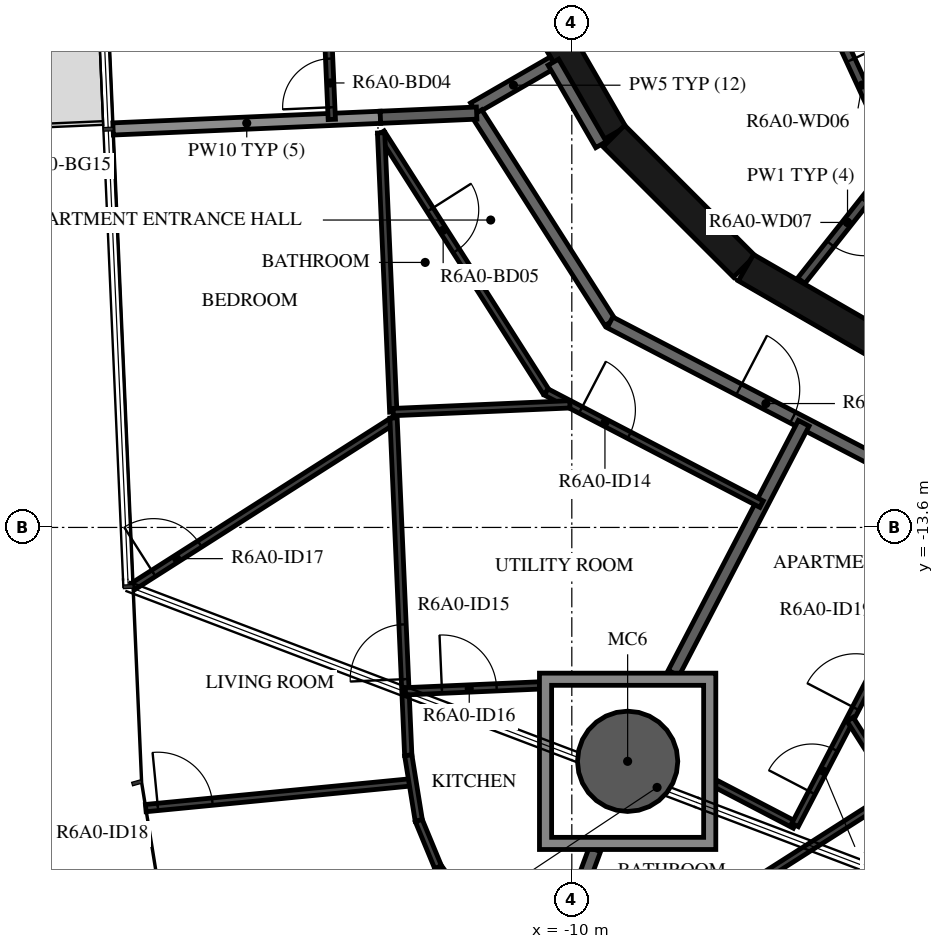
"""IFC4 building model, lengths in metres.
Left out: names, types, materials, properties, quantities, classifications, styles, units other than length and angle.
Written with IfcOpenShell. Run it as: python <this file> out.ifc"""

import sys

from ifc_helpers import new_model, si_unit, direction, frame, frame_2d, origin, origin_2d, place, context, subcontext, project, spatial, polyline, rectangle, hollow_circle, outline, extrude, element, fill, save


model = new_model("IFC4")
c1 = context("Model", 3, precision=1e-05, world=origin(), true_north=direction((0.0, 1.0)))
c2 = subcontext(c1, "Body", "Model", "MODEL_VIEW")
j1 = project(units=[si_unit("LENGTHUNIT", "METRE"), si_unit("PLANEANGLEUNIT", "RADIAN")], contexts=[c1])
p1 = place(None, origin())
s1 = spatial("IfcSite", under=j1, at=p1, CompositionType="ELEMENT")
p2 = place(p1, origin())
s2 = spatial("IfcBuilding", under=s1, at=p2, CompositionType="ELEMENT")
p3 = place(p2, frame((0.0, 0.0, 233.7)))
s3 = spatial("IfcBuildingStorey", under=s2, at=p3, CompositionType="ELEMENT", Elevation=233.7)
p4 = place(p3, frame((-9.082, -17.446, -0.38), z_axis=(0.0, 0.0, 1.0), x_axis=(1.0, 0.0, 0.0)))
e1 = element("IfcColumn", 1, at=p4, inside=s3, PredefinedType="COLUMN", context=c2, shape_type="SweptSolid", body=[
    extrude(hollow_circle(Radius=0.825, WallThickness=0.04, at=origin_2d()), origin(), (0.0, 0.0, 1.0), 3.5),
])
p5 = place(p3, frame((-10.845, -4.51, 0.0), z_axis=(0.0, 0.0, 1.0), x_axis=(0.500087131594, -0.865975092491, 0.0)))
e2 = element("IfcWall", 2, at=p5, inside=s3, PredefinedType="SHEAR", context=c2, shape_type="SweptSolid", body=[
    extrude(rectangle(XDim=3.033, YDim=0.5, at=frame_2d((1.516, 0.0))), origin(), (0.0, 0.0, 1.0), 3.12),
])
p6 = place(p3, frame((-9.308, -7.164, 0.0), z_axis=(0.0, 0.0, 1.0), x_axis=(0.707106781187, -0.707106781187, 0.0)))
e3 = element("IfcWall", 3, at=p6, inside=s3, PredefinedType="SHEAR", context=c2, shape_type="SweptSolid", body=[
    extrude(rectangle(XDim=3.032, YDim=0.5, at=frame_2d((1.516, 0.0))), origin(), (0.0, 0.0, 1.0), 3.12),
])
p7 = place(p3, frame((-7.137, -9.329, 0.0), z_axis=(0.0, 0.0, 1.0), x_axis=(0.865975092491, -0.500087131594, 0.0)))
e4 = element("IfcWall", 4, at=p7, inside=s3, PredefinedType="SHEAR", context=c2, shape_type="SweptSolid", body=[
    extrude(rectangle(XDim=3.033, YDim=0.5, at=frame_2d((1.516, 0.0))), origin(), (0.0, 0.0, 1.0), 3.12),
])
p8 = place(p3, frame((-5.795, -5.086, 0.0), z_axis=(0.0, 0.0, 1.0), x_axis=(0.417887867606, -0.908498613157, 0.0)))
e5 = element("IfcWall", 5, at=p8, inside=s3, PredefinedType="PARTITIONING", context=c2, shape_type="SweptSolid", body=[
    extrude(rectangle(XDim=2.726, YDim=0.15, at=frame_2d((1.363, 0.0))), origin(), (0.0, 0.0, 1.0), 3.12),
])
p9 = place(p8, frame((0.913, 0.0, 0.0)))
e6 = element("IfcOpeningElement", 6, at=p9, cuts=e5, PredefinedType="OPENING", context=c2, shape_type="SweptSolid", body=[
    extrude(rectangle(XDim=0.9, YDim=2.1, at=frame_2d((0.45, 1.05))), frame((0.0, 0.085, 0.0), z_axis=(0.0, -1.0, 0.0), x_axis=(1.0, 0.0, 0.0)), (0.0, 0.0, 1.0), 0.17),
])
p10 = place(p3, frame((-4.706, -7.625, 0.0), z_axis=(0.0, 0.0, 1.0), x_axis=(-0.621392599334, -0.783499353856, 0.0)))
e7 = element("IfcWall", 7, at=p10, inside=s3, PredefinedType="PARTITIONING", context=c2, shape_type="SweptSolid", body=[
    extrude(rectangle(XDim=2.447, YDim=0.15, at=frame_2d((1.224, 0.0))), origin(), (0.0, 0.0, 1.0), 3.12),
])
p11 = place(p10, frame((0.774, 0.0, 0.0)))
e8 = element("IfcOpeningElement", 8, at=p11, cuts=e7, PredefinedType="OPENING", context=c2, shape_type="SweptSolid", body=[
    extrude(rectangle(XDim=0.9, YDim=2.1, at=frame_2d((0.45, 1.05))), frame((0.0, 0.085, 0.0), z_axis=(0.0, -1.0, 0.0), x_axis=(1.0, 0.0, 0.0)), (0.0, 0.0, 1.0), 0.17),
])
p12 = place(p3, frame((-10.303, -5.949, 0.0), z_axis=(0.0, 0.0, 1.0), x_axis=(-0.866043382451, -0.499968858743, 0.0)))
e9 = element("IfcWall", 9, at=p12, inside=s3, PredefinedType="STANDARD", context=c2, shape_type="SweptSolid", body=[
    extrude(rectangle(XDim=1.515, YDim=0.2, at=frame_2d((0.758, 0.0))), origin(), (0.0, 0.0, 1.0), 3.12),
])
p13 = place(p3, frame((-9.52, -7.305, 0.0), z_axis=(0.0, 0.0, 1.0), x_axis=(-0.500028278809, 0.866009076391, 0.0)))
e10 = element("IfcWall", 10, at=p13, inside=s3, PredefinedType="STANDARD", context=c2, shape_type="SweptSolid", body=[
    extrude(rectangle(XDim=1.566, YDim=0.2, at=frame_2d((0.783, 0.0))), origin(), (0.0, 0.0, 1.0), 3.12),
])
p14 = place(p3, frame((-11.565, -6.786, 0.0), z_axis=(0.0, 0.0, 1.0), x_axis=(0.537297327359, -0.843392898958, 0.0)))
e11 = element("IfcWall", 11, at=p14, inside=s3, PredefinedType="STANDARD", context=c2, shape_type="SweptSolid", body=[
    extrude(rectangle(XDim=4.081, YDim=0.2, at=frame_2d((2.041, 0.0))), origin(), (0.0, 0.0, 1.0), 3.12),
])
p15 = place(p3, frame((-9.372, -10.228, 0.0), z_axis=(0.0, 0.0, 1.0), x_axis=(0.887005184532, -0.461759464021, 0.0)))
e12 = element("IfcWall", 12, at=p15, inside=s3, PredefinedType="STANDARD", context=c2, shape_type="SweptSolid", body=[
    extrude(rectangle(XDim=7.181, YDim=0.2, at=frame_2d((3.591, 0.0))), origin(), (0.0, 0.0, 1.0), 3.12),
])
p16 = place(p15, frame((2.391, 0.0, 0.0)))
e13 = element("IfcOpeningElement", 13, at=p16, cuts=e12, PredefinedType="OPENING", context=c2, shape_type="SweptSolid", body=[
    extrude(rectangle(XDim=1.0, YDim=2.1, at=frame_2d((0.5, 1.05))), frame((0.0, 0.11, 0.0), z_axis=(0.0, -1.0, 0.0), x_axis=(1.0, 0.0, 0.0)), (0.0, 0.0, 1.0), 0.22),
])
p17 = place(p3, frame((-17.544, -7.047, 0.0), z_axis=(0.0, 0.0, 1.0), x_axis=(0.99904608111, 0.043668384662, 0.0)))
e14 = element("IfcWall", 14, at=p17, inside=s3, PredefinedType="STANDARD", context=c2, shape_type="SweptSolid", body=[
    extrude(rectangle(XDim=4.4, YDim=0.2, at=frame_2d((2.2, 0.0))), origin(), (0.0, 0.0, 1.0), 2.73),
])
p18 = place(p3, frame((-13.148, -6.855, 0.0), z_axis=(0.0, 0.0, 1.0), x_axis=(0.999048583464, 0.043611098121, 0.0)))
e15 = element("IfcWall", 15, at=p18, inside=s3, PredefinedType="STANDARD", context=c2, shape_type="SweptSolid", body=[
    extrude(rectangle(XDim=1.584, YDim=0.2, at=frame_2d((0.792, 0.0))), origin(), (0.0, 0.0, 1.0), 3.12),
])
p19 = place(p3, frame((-8.326, -15.996, 0.0), z_axis=(0.0, 0.0, 1.0), x_axis=(0.461739255077, 0.887015704664, 0.0)))
e16 = element("IfcWall", 16, at=p19, inside=s3, PredefinedType="STANDARD", context=c2, shape_type="SweptSolid", body=[
    extrude(rectangle(XDim=4.633, YDim=0.2, at=frame_2d((2.317, 0.0))), origin(), (0.0, 0.0, 1.0), 3.12),
])
p20 = place(p3, frame((-10.044, -20.036, 0.0), z_axis=(0.0, 0.0, 1.0), x_axis=(0.348282344491, 0.937389678051, 0.0)))
e17 = element("IfcWall", 17, at=p20, inside=s3, PredefinedType="STANDARD", context=c2, shape_type="SweptSolid", body=[
    extrude(rectangle(XDim=1.216, YDim=0.2, at=frame_2d((0.608, 0.0))), origin(), (0.0, 0.0, 1.0), 3.12),
])
p21 = place(p3, frame((-13.947, -6.89, 0.0), z_axis=(0.0, 0.0, 1.0), x_axis=(-0.043680814195, 0.999045537737, 0.0)))
e18 = element("IfcWall", 18, at=p21, inside=s3, PredefinedType="PARTITIONING", context=c2, shape_type="SweptSolid", body=[
    extrude(rectangle(XDim=2.392, YDim=0.12, at=frame_2d((1.196, 0.0))), origin(), (0.0, 0.0, 1.0), 3.12),
])
p22 = place(p21, frame((0.2, 0.0, 0.0)))
e19 = element("IfcOpeningElement", 19, at=p22, cuts=e18, PredefinedType="OPENING", context=c2, shape_type="SweptSolid", body=[
    extrude(rectangle(XDim=0.8, YDim=2.1, at=frame_2d((0.4, 1.05))), frame((0.0, 0.07, 0.0), z_axis=(0.0, -1.0, 0.0), x_axis=(1.0, 0.0, 0.0)), (0.0, 0.0, 1.0), 0.14),
])
p23 = place(p3, frame((-13.137, -7.111, 0.0), z_axis=(0.0, 0.0, 1.0), x_axis=(0.537300549444, -0.843390846267, 0.0)))
e20 = element("IfcWall", 20, at=p23, inside=s3, PredefinedType="PARTITIONING", context=c2, shape_type="SweptSolid", body=[
    extrude(rectangle(XDim=5.054, YDim=0.12, at=frame_2d((2.527, 0.0))), origin(), (0.0, 0.0, 1.0), 3.12),
])
p24 = place(p23, frame((1.5, 0.0, 0.0)))
e21 = element("IfcOpeningElement", 21, at=p24, cuts=e20, PredefinedType="OPENING", context=c2, shape_type="SweptSolid", body=[
    extrude(rectangle(XDim=0.8, YDim=2.1, at=frame_2d((0.4, 1.05))), frame((0.0, 0.07, 0.0), z_axis=(0.0, -1.0, 0.0), x_axis=(1.0, 0.0, 0.0)), (0.0, 0.0, 1.0), 0.14),
])
p25 = place(p3, frame((-10.421, -11.373, 0.0), z_axis=(0.0, 0.0, 1.0), x_axis=(0.887006451745, -0.461757029792, 0.0)))
e22 = element("IfcWall", 22, at=p25, inside=s3, PredefinedType="PARTITIONING", context=c2, shape_type="SweptSolid", body=[
    extrude(rectangle(XDim=3.992, YDim=0.12, at=frame_2d((1.996, 0.0))), origin(), (0.0, 0.0, 1.0), 3.12),
])
p26 = place(p25, frame((0.639, 0.0, 0.0)))
e23 = element("IfcOpeningElement", 23, at=p26, cuts=e22, PredefinedType="OPENING", context=c2, shape_type="SweptSolid", body=[
    extrude(rectangle(XDim=0.9, YDim=2.1, at=frame_2d((0.45, 1.05))), frame((0.0, 0.07, 0.0), z_axis=(0.0, -1.0, 0.0), x_axis=(1.0, 0.0, 0.0)), (0.0, 0.0, 1.0), 0.14),
])
p27 = place(p3, frame((-12.936, -11.703, 0.0), z_axis=(0.0, 0.0, 1.0), x_axis=(-0.043610108597, 0.999048626658, 0.0)))
e24 = element("IfcWall", 24, at=p27, inside=s3, PredefinedType="PARTITIONING", context=c2, shape_type="SweptSolid", body=[
    extrude(rectangle(XDim=4.596, YDim=0.12, at=frame_2d((2.298, 0.0))), origin(), (0.0, 0.0, 1.0), 3.12),
])
p28 = place(p3, frame((-17.215, -14.57, 0.0), z_axis=(0.0, 0.0, 1.0), x_axis=(0.843396239681, 0.537292083407, 0.0)))
e25 = element("IfcWall", 25, at=p28, inside=s3, PredefinedType="PARTITIONING", context=c2, shape_type="SweptSolid", body=[
    extrude(rectangle(XDim=5.081, YDim=0.12, at=frame_2d((2.54, 0.0))), origin(), (0.0, 0.0, 1.0), 3.12),
])
p29 = place(p28, frame((0.4, 0.0, 0.0)))
e26 = element("IfcOpeningElement", 26, at=p29, cuts=e25, PredefinedType="OPENING", context=c2, shape_type="SweptSolid", body=[
    extrude(rectangle(XDim=0.9, YDim=2.1, at=frame_2d((0.45, 1.05))), frame((0.0, 0.07, 0.0), z_axis=(0.0, -1.0, 0.0), x_axis=(1.0, 0.0, 0.0)), (0.0, 0.0, 1.0), 0.14),
])
p30 = place(p3, frame((-12.936, -11.703, 0.0), z_axis=(0.0, 0.0, 1.0), x_axis=(0.999046310188, 0.043663143495, 0.0)))
e27 = element("IfcWall", 27, at=p30, inside=s3, PredefinedType="PARTITIONING", context=c2, shape_type="SweptSolid", body=[
    extrude(rectangle(XDim=2.907, YDim=0.12, at=frame_2d((1.454, 0.0))), origin(), (0.0, 0.0, 1.0), 3.12),
])
p31 = place(p3, frame((-12.69, -17.347, 0.0), z_axis=(0.0, 0.0, 1.0), x_axis=(-0.043618497177, 0.999048260448, 0.0)))
e28 = element("IfcWall", 28, at=p31, inside=s3, PredefinedType="PARTITIONING", context=c2, shape_type="SweptSolid", body=[
    extrude(rectangle(XDim=5.552, YDim=0.12, at=frame_2d((2.776, 0.0))), origin(), (0.0, 0.0, 1.0), 3.12),
])
p32 = place(p31, frame((1.254, 0.0, 0.0)))
e29 = element("IfcOpeningElement", 29, at=p32, cuts=e28, PredefinedType="OPENING", context=c2, shape_type="SweptSolid", body=[
    extrude(rectangle(XDim=0.9, YDim=2.1, at=frame_2d((0.45, 1.05))), frame((0.0, 0.07, 0.0), z_axis=(0.0, -1.0, 0.0), x_axis=(1.0, 0.0, 0.0)), (0.0, 0.0, 1.0), 0.14),
])
p33 = place(p3, frame((-17.007, -18.216, 0.0), z_axis=(0.0, 0.0, 1.0), x_axis=(0.995320337688, 0.09663035436, 0.0)))
e30 = element("IfcWall", 30, at=p33, inside=s3, PredefinedType="PARTITIONING", context=c2, shape_type="SweptSolid", body=[
    extrude(rectangle(XDim=4.409, YDim=0.12, at=frame_2d((2.205, 0.0))), origin(), (0.0, 0.0, 1.0), 3.12),
])
p34 = place(p33, frame((0.2, 0.0, 0.0)))
e31 = element("IfcOpeningElement", 31, at=p34, cuts=e30, PredefinedType="OPENING", context=c2, shape_type="SweptSolid", body=[
    extrude(rectangle(XDim=0.9, YDim=2.1, at=frame_2d((0.45, 1.05))), frame((0.0, 0.07, 0.0), z_axis=(0.0, -1.0, 0.0), x_axis=(1.0, 0.0, 0.0)), (0.0, 0.0, 1.0), 0.14),
])
p35 = place(p3, frame((-12.517, -18.42, 0.0), z_axis=(0.0, 0.0, 1.0), x_axis=(-0.159260688022, 0.987236563976, 0.0)))
e32 = element("IfcWall", 32, at=p35, inside=s3, PredefinedType="PARTITIONING", context=c2, shape_type="SweptSolid", body=[
    extrude(rectangle(XDim=1.087, YDim=0.12, at=frame_2d((0.543, 0.0))), origin(), (0.0, 0.0, 1.0), 3.12),
])
p36 = place(p3, frame((-12.736, -16.295, 0.0), z_axis=(0.0, 0.0, 1.0), x_axis=(0.999043796611, 0.043720618177, 0.0)))
e33 = element("IfcWall", 33, at=p36, inside=s3, PredefinedType="PARTITIONING", context=c2, shape_type="SweptSolid", body=[
    extrude(rectangle(XDim=2.206, YDim=0.12, at=frame_2d((1.103, 0.0))), origin(), (0.0, 0.0, 1.0), 3.12),
])
p37 = place(p36, frame((0.6, 0.0, 0.0)))
e34 = element("IfcOpeningElement", 34, at=p37, cuts=e33, PredefinedType="OPENING", context=c2, shape_type="SweptSolid", body=[
    extrude(rectangle(XDim=0.9, YDim=2.1, at=frame_2d((0.45, 1.05))), frame((0.0, 0.07, 0.0), z_axis=(0.0, -1.0, 0.0), x_axis=(1.0, 0.0, 0.0)), (0.0, 0.0, 1.0), 0.14),
])
p38 = place(p3, frame((-11.714, -19.858, 0.0), z_axis=(0.0, 0.0, 1.0), x_axis=(-0.585436792562, 0.810718053281, 0.0)))
e35 = element("IfcWall", 35, at=p38, inside=s3, PredefinedType="PARTITIONING", context=c2, shape_type="SweptSolid", body=[
    extrude(rectangle(XDim=0.829, YDim=0.12, at=frame_2d((0.415, 0.0))), origin(), (0.0, 0.0, 1.0), 3.12),
])
p39 = place(p3, frame((-12.199, -19.186, 0.0), z_axis=(0.0, 0.0, 1.0), x_axis=(-0.382585904135, 0.923919923996, 0.0)))
e36 = element("IfcWall", 36, at=p39, inside=s3, PredefinedType="PARTITIONING", context=c2, shape_type="SweptSolid", body=[
    extrude(rectangle(XDim=0.829, YDim=0.12, at=frame_2d((0.415, 0.0))), origin(), (0.0, 0.0, 1.0), 3.12),
])
p40 = place(p3, frame((-7.632, -17.815, 0.0), z_axis=(0.0, 0.0, 1.0), x_axis=(0.886960889958, -0.461844540602, 0.0)))
e37 = element("IfcWall", 37, at=p40, inside=s3, PredefinedType="PARTITIONING", context=c2, shape_type="SweptSolid", body=[
    extrude(rectangle(XDim=1.469, YDim=0.12, at=frame_2d((0.734, 0.0))), origin(), (0.0, 0.0, 1.0), 3.12),
])
p41 = place(p3, frame((-6.329, -18.494, 0.0), z_axis=(0.0, 0.0, 1.0), x_axis=(0.461759058182, 0.887005395805, 0.0)))
e38 = element("IfcWall", 38, at=p41, inside=s3, PredefinedType="PARTITIONING", context=c2, shape_type="SweptSolid", body=[
    extrude(rectangle(XDim=4.427, YDim=0.12, at=frame_2d((2.213, 0.0))), origin(), (0.0, 0.0, 1.0), 3.12),
])
p42 = place(p41, frame((0.6, 0.0, 0.0)))
e39 = element("IfcOpeningElement", 39, at=p42, cuts=e38, PredefinedType="OPENING", context=c2, shape_type="SweptSolid", body=[
    extrude(rectangle(XDim=0.8, YDim=2.1, at=frame_2d((0.4, 1.05))), frame((0.0, 0.07, 0.0), z_axis=(0.0, -1.0, 0.0), x_axis=(1.0, 0.0, 0.0)), (0.0, 0.0, 1.0), 0.14),
])
p43 = place(p41, frame((2.161, 0.0, 0.0)))
e40 = element("IfcOpeningElement", 40, at=p43, cuts=e38, PredefinedType="OPENING", context=c2, shape_type="SweptSolid", body=[
    extrude(rectangle(XDim=0.9, YDim=2.1, at=frame_2d((0.45, 1.05))), frame((0.0, 0.07, 0.0), z_axis=(0.0, -1.0, 0.0), x_axis=(1.0, 0.0, 0.0)), (0.0, 0.0, 1.0), 0.14),
])
p44 = place(p3, frame((-4.662, -17.95, 0.0), z_axis=(0.0, 0.0, 1.0), x_axis=(-0.537254271207, 0.843420327043, 0.0)))
e41 = element("IfcWall", 41, at=p44, inside=s3, PredefinedType="PARTITIONING", context=c2, shape_type="SweptSolid", body=[
    extrude(rectangle(XDim=1.418, YDim=0.12, at=frame_2d((0.709, 0.0))), origin(), (0.0, 0.0, 1.0), 3.12),
])
p45 = place(p3, frame((-7.322, -19.645, 0.0), z_axis=(0.0, 0.0, 1.0), x_axis=(0.843385361817, 0.537309158188, 0.0)))
e42 = element("IfcWall", 42, at=p45, inside=s3, PredefinedType="PARTITIONING", context=c2, shape_type="SweptSolid", body=[
    extrude(rectangle(XDim=8.814, YDim=0.12, at=frame_2d((4.407, 0.0))), origin(), (0.0, 0.0, 1.0), 3.12),
])
p46 = place(p45, frame((3.314, 0.0, 0.0)))
e43 = element("IfcOpeningElement", 43, at=p46, cuts=e42, PredefinedType="OPENING", context=c2, shape_type="SweptSolid", body=[
    extrude(rectangle(XDim=0.9, YDim=2.1, at=frame_2d((0.45, 1.05))), frame((0.0, 0.07, 0.0), z_axis=(0.0, -1.0, 0.0), x_axis=(1.0, 0.0, 0.0)), (0.0, 0.0, 1.0), 0.14),
])
p47 = place(p3, origin())
e44 = element("IfcWall", 44, at=p47, inside=s3, PredefinedType="STANDARD", context=c2, shape_type="SweptSolid", body=[
    extrude(outline(polyline([(-7.632, -15.996), (-7.632, -18.896), (-10.532, -18.896), (-10.532, -15.996), (-7.632, -15.996)]), holes=[polyline([(-10.332, -18.696), (-7.832, -18.696), (-7.832, -16.196), (-10.332, -16.196), (-10.332, -18.696)])]), origin(), (0.0, 0.0, 1.0), 3.12),
])
p48 = place(p9, origin())
e45 = element("IfcDoor", 45, at=p48, inside=s3, OperationType="SINGLE_SWING_RIGHT", PredefinedType="DOOR", context=c2, shape_type="SweptSolid", body=[
    extrude(rectangle(XDim=0.9, YDim=2.1, at=frame_2d((0.45, 1.05))), frame((0.0, 0.025, 0.0), z_axis=(0.0, -1.0, 0.0), x_axis=(1.0, 0.0, 0.0)), (0.0, 0.0, 1.0), 0.05),
])
fill(e6, e45)
p49 = place(p11, origin())
e46 = element("IfcDoor", 46, at=p49, inside=s3, OperationType="SINGLE_SWING_LEFT", PredefinedType="DOOR", context=c2, shape_type="SweptSolid", body=[
    extrude(rectangle(XDim=0.9, YDim=2.1, at=frame_2d((0.45, 1.05))), frame((0.0, 0.025, 0.0), z_axis=(0.0, -1.0, 0.0), x_axis=(1.0, 0.0, 0.0)), (0.0, 0.0, 1.0), 0.05),
])
fill(e8, e46)
p50 = place(p22, origin())
e47 = element("IfcDoor", 47, at=p50, inside=s3, OperationType="SINGLE_SWING_LEFT", PredefinedType="DOOR", context=c2, shape_type="SweptSolid", body=[
    extrude(rectangle(XDim=0.8, YDim=2.1, at=frame_2d((0.4, 1.05))), frame((0.0, 0.025, 0.0), z_axis=(0.0, -1.0, 0.0), x_axis=(1.0, 0.0, 0.0)), (0.0, 0.0, 1.0), 0.05),
])
fill(e19, e47)
p51 = place(p16, origin())
e48 = element("IfcDoor", 48, at=p51, inside=s3, OperationType="SINGLE_SWING_RIGHT", PredefinedType="DOOR", context=c2, shape_type="SweptSolid", body=[
    extrude(rectangle(XDim=1.0, YDim=2.1, at=frame_2d((0.5, 1.05))), frame((0.0, 0.025, 0.0), z_axis=(0.0, -1.0, 0.0), x_axis=(1.0, 0.0, 0.0)), (0.0, 0.0, 1.0), 0.05),
])
fill(e13, e48)
p52 = place(p24, origin())
e49 = element("IfcDoor", 49, at=p52, inside=s3, OperationType="SINGLE_SWING_RIGHT", PredefinedType="DOOR", context=c2, shape_type="SweptSolid", body=[
    extrude(rectangle(XDim=0.8, YDim=2.1, at=frame_2d((0.4, 1.05))), frame((0.0, 0.025, 0.0), z_axis=(0.0, -1.0, 0.0), x_axis=(1.0, 0.0, 0.0)), (0.0, 0.0, 1.0), 0.05),
])
fill(e21, e49)
p53 = place(p26, origin())
e50 = element("IfcDoor", 50, at=p53, inside=s3, OperationType="SINGLE_SWING_RIGHT", PredefinedType="DOOR", context=c2, shape_type="SweptSolid", body=[
    extrude(rectangle(XDim=0.9, YDim=2.1, at=frame_2d((0.45, 1.05))), frame((0.0, 0.025, 0.0), z_axis=(0.0, -1.0, 0.0), x_axis=(1.0, 0.0, 0.0)), (0.0, 0.0, 1.0), 0.05),
])
fill(e23, e50)
p54 = place(p32, origin())
e51 = element("IfcDoor", 51, at=p54, inside=s3, OperationType="SINGLE_SWING_RIGHT", PredefinedType="DOOR", context=c2, shape_type="SweptSolid", body=[
    extrude(rectangle(XDim=0.9, YDim=2.1, at=frame_2d((0.45, 1.05))), frame((0.0, 0.025, 0.0), z_axis=(0.0, -1.0, 0.0), x_axis=(1.0, 0.0, 0.0)), (0.0, 0.0, 1.0), 0.05),
])
fill(e29, e51)
p55 = place(p37, origin())
e52 = element("IfcDoor", 52, at=p55, inside=s3, OperationType="SINGLE_SWING_RIGHT", PredefinedType="DOOR", context=c2, shape_type="SweptSolid", body=[
    extrude(rectangle(XDim=0.9, YDim=2.1, at=frame_2d((0.45, 1.05))), frame((0.0, 0.025, 0.0), z_axis=(0.0, -1.0, 0.0), x_axis=(1.0, 0.0, 0.0)), (0.0, 0.0, 1.0), 0.05),
])
fill(e34, e52)
p56 = place(p29, origin())
e53 = element("IfcDoor", 53, at=p56, inside=s3, OperationType="SINGLE_SWING_LEFT", PredefinedType="DOOR", context=c2, shape_type="SweptSolid", body=[
    extrude(rectangle(XDim=0.9, YDim=2.1, at=frame_2d((0.45, 1.05))), frame((0.0, 0.025, 0.0), z_axis=(0.0, -1.0, 0.0), x_axis=(1.0, 0.0, 0.0)), (0.0, 0.0, 1.0), 0.05),
])
fill(e26, e53)
p57 = place(p34, origin())
e54 = element("IfcDoor", 54, at=p57, inside=s3, OperationType="SINGLE_SWING_RIGHT", PredefinedType="DOOR", context=c2, shape_type="SweptSolid", body=[
    extrude(rectangle(XDim=0.9, YDim=2.1, at=frame_2d((0.45, 1.05))), frame((0.0, 0.025, 0.0), z_axis=(0.0, -1.0, 0.0), x_axis=(1.0, 0.0, 0.0)), (0.0, 0.0, 1.0), 0.05),
])
fill(e31, e54)
p58 = place(p42, origin())
e55 = element("IfcDoor", 55, at=p58, inside=s3, OperationType="SINGLE_SWING_LEFT", PredefinedType="DOOR", context=c2, shape_type="SweptSolid", body=[
    extrude(rectangle(XDim=0.8, YDim=2.1, at=frame_2d((0.4, 1.05))), frame((0.0, 0.025, 0.0), z_axis=(0.0, -1.0, 0.0), x_axis=(1.0, 0.0, 0.0)), (0.0, 0.0, 1.0), 0.05),
])
fill(e39, e55)
p59 = place(p43, origin())
e56 = element("IfcDoor", 56, at=p59, inside=s3, OperationType="SINGLE_SWING_LEFT", PredefinedType="DOOR", context=c2, shape_type="SweptSolid", body=[
    extrude(rectangle(XDim=0.9, YDim=2.1, at=frame_2d((0.45, 1.05))), frame((0.0, 0.025, 0.0), z_axis=(0.0, -1.0, 0.0), x_axis=(1.0, 0.0, 0.0)), (0.0, 0.0, 1.0), 0.05),
])
fill(e40, e56)
save(model, sys.argv[1])
